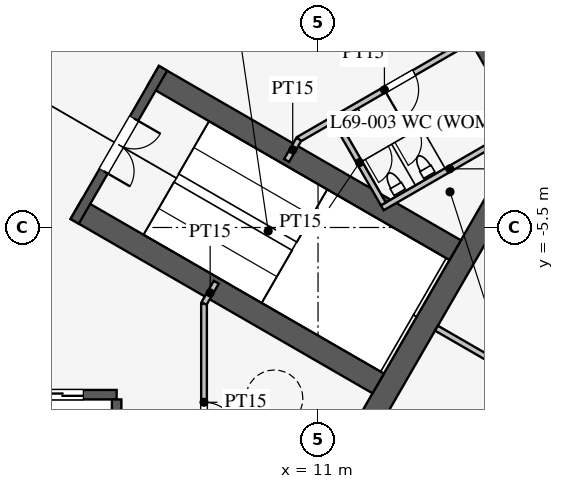
"""IFC4 building model, lengths in metres.
Left out: names, types, materials, properties, quantities, classifications, styles, units other than length and angle.
Written with IfcOpenShell. Run it as: python <this file> out.ifc"""

import sys

from ifc_helpers import new_model, si_unit, direction, frame, frame_2d, origin, place, context, subcontext, project, spatial, rectangle, extrude, element, fill, save


model = new_model("IFC4")
c1 = context("Model", 3, precision=1e-05, world=origin(), true_north=direction((0.0, 1.0)))
c2 = subcontext(c1, "Body", "Model", "MODEL_VIEW")
j1 = project(units=[si_unit("LENGTHUNIT", "METRE"), si_unit("PLANEANGLEUNIT", "RADIAN")], contexts=[c1])
p1 = place(None, origin())
s1 = spatial("IfcSite", under=j1, at=p1, CompositionType="ELEMENT")
p2 = place(p1, origin())
s2 = spatial("IfcBuilding", under=s1, at=p2, CompositionType="ELEMENT")
p3 = place(p2, frame((0.0, 0.0, 301.5)))
s3 = spatial("IfcBuildingStorey", under=s2, at=p3, CompositionType="ELEMENT", Elevation=301.5)
p4 = place(p3, frame((10.97, -13.0, 0.0), z_axis=(0.0, 0.0, 1.0), x_axis=(0.499995765644, 0.866027848477, 0.0)))
e1 = element("IfcWall", 1, at=p4, inside=s3, PredefinedType="SHEAR", context=c2, shape_type="SweptSolid", body=[
    extrude(rectangle(XDim=11.547, YDim=0.6, at=frame_2d((5.773, 0.0))), origin(), (0.0, 0.0, 1.0), 4.2),
])
p5 = place(p3, frame((16.743, -3.0, 0.0), z_axis=(0.0, 0.0, 1.0), x_axis=(-0.500002442456, 0.866023993627, 0.0)))
e2 = element("IfcWall", 2, at=p5, inside=s3, PredefinedType="SHEAR", context=c2, shape_type="SweptSolid", body=[
    extrude(rectangle(XDim=21.939, YDim=0.6, at=frame_2d((10.97, 0.0))), origin(), (0.0, 0.0, 1.0), 4.2),
])
p6 = place(p5, frame((17.27, 0.0, 0.0)))
e3 = element("IfcOpeningElement", 3, at=p6, cuts=e2, PredefinedType="OPENING", context=c2, shape_type="SweptSolid", body=[
    extrude(rectangle(XDim=1.2, YDim=2.1, at=frame_2d((0.6, 1.05))), frame((0.0, 0.31, 0.0), z_axis=(0.0, -1.0, 0.0), x_axis=(1.0, 0.0, 0.0)), (0.0, 0.0, 1.0), 0.62),
])
p7 = place(p5, frame((3.47, 0.0, 0.0)))
e4 = element("IfcOpeningElement", 4, at=p7, cuts=e2, PredefinedType="OPENING", context=c2, shape_type="SweptSolid", body=[
    extrude(rectangle(XDim=1.2, YDim=2.1, at=frame_2d((0.6, 1.05))), frame((0.0, 0.31, 0.0), z_axis=(0.0, -1.0, 0.0), x_axis=(1.0, 0.0, 0.0)), (0.0, 0.0, 1.0), 0.62),
])
p8 = place(p3, frame((-5.7, -9.9, 0.0), z_axis=(0.0, 0.0, 1.0), x_axis=(1.0, 0.0, 0.0)))
e5 = element("IfcWall", 5, at=p8, inside=s3, PredefinedType="SHEAR", context=c2, shape_type="SweptSolid", body=[
    extrude(rectangle(XDim=11.4, YDim=0.25, at=frame_2d((5.7, 0.0))), origin(), (0.0, 0.0, 1.0), 4.2),
])
p9 = place(p8, frame((0.875, 0.0, 0.0)))
e6 = element("IfcOpeningElement", 6, at=p9, cuts=e5, PredefinedType="OPENING", context=c2, shape_type="SweptSolid", body=[
    extrude(rectangle(XDim=1.1, YDim=2.2, at=frame_2d((0.55, 1.1))), frame((0.0, 0.135, 0.0), z_axis=(0.0, -1.0, 0.0), x_axis=(1.0, 0.0, 0.0)), (0.0, 0.0, 1.0), 0.27),
])
p10 = place(p8, frame((3.725, 0.0, 0.0)))
e7 = element("IfcOpeningElement", 7, at=p10, cuts=e5, PredefinedType="OPENING", context=c2, shape_type="SweptSolid", body=[
    extrude(rectangle(XDim=1.1, YDim=2.2, at=frame_2d((0.55, 1.1))), frame((0.0, 0.135, 0.0), z_axis=(0.0, -1.0, 0.0), x_axis=(1.0, 0.0, 0.0)), (0.0, 0.0, 1.0), 0.27),
])
p11 = place(p8, frame((6.575, 0.0, 0.0)))
e8 = element("IfcOpeningElement", 8, at=p11, cuts=e5, PredefinedType="OPENING", context=c2, shape_type="SweptSolid", body=[
    extrude(rectangle(XDim=1.1, YDim=2.2, at=frame_2d((0.55, 1.1))), frame((0.0, 0.135, 0.0), z_axis=(0.0, -1.0, 0.0), x_axis=(1.0, 0.0, 0.0)), (0.0, 0.0, 1.0), 0.27),
])
p12 = place(p8, frame((9.425, 0.0, 0.0)))
e9 = element("IfcOpeningElement", 9, at=p12, cuts=e5, PredefinedType="OPENING", context=c2, shape_type="SweptSolid", body=[
    extrude(rectangle(XDim=1.1, YDim=2.2, at=frame_2d((0.55, 1.1))), frame((0.0, 0.135, 0.0), z_axis=(0.0, -1.0, 0.0), x_axis=(1.0, 0.0, 0.0)), (0.0, 0.0, 1.0), 0.27),
])
p13 = place(p3, frame((5.7, -10.025, 0.0), z_axis=(0.0, 0.0, 1.0), x_axis=(0.0, -1.0, 0.0)))
e10 = element("IfcWall", 10, at=p13, inside=s3, PredefinedType="SHEAR", context=c2, shape_type="SweptSolid", body=[
    extrude(rectangle(XDim=2.675, YDim=0.25, at=frame_2d((1.337, 0.0))), origin(), (0.0, 0.0, 1.0), 4.2),
])
p14 = place(p3, frame((4.638, -5.016, 0.0), z_axis=(0.0, 0.0, 1.0), x_axis=(0.866012320003, -0.50002266109, 0.0)))
e11 = element("IfcWall", 11, at=p14, inside=s3, PredefinedType="SHEAR", context=c2, shape_type="SweptSolid", body=[
    extrude(rectangle(XDim=9.175, YDim=0.6, at=frame_2d((4.587, 0.0))), origin(), (0.0, 0.0, 1.0), 4.2),
])
p15 = place(p3, frame((6.663, -1.509, 0.0), z_axis=(0.0, 0.0, 1.0), x_axis=(0.86603049496, -0.499991181721, 0.0)))
e12 = element("IfcWall", 12, at=p15, inside=s3, PredefinedType="SHEAR", context=c2, shape_type="SweptSolid", body=[
    extrude(rectangle(XDim=9.175, YDim=0.6, at=frame_2d((4.587, 0.0))), origin(), (0.0, 0.0, 1.0), 4.2),
])
p16 = place(p3, frame((4.597, -5.339, 0.0), z_axis=(0.0, 0.0, 1.0), x_axis=(0.499984536904, 0.866034331223, 0.0)))
e13 = element("IfcWall", 13, at=p16, inside=s3, PredefinedType="SHEAR", context=c2, shape_type="SweptSolid", body=[
    extrude(rectangle(XDim=4.65, YDim=0.25, at=frame_2d((2.325, 0.0))), origin(), (0.0, 0.0, 1.0), 4.2),
])
p17 = place(p16, frame((1.525, 0.0, 0.0)))
e14 = element("IfcOpeningElement", 14, at=p17, cuts=e13, PredefinedType="OPENING", context=c2, shape_type="SweptSolid", body=[
    extrude(rectangle(XDim=1.6, YDim=2.1, at=frame_2d((0.8, 1.05))), frame((0.0, 0.135, 0.0), z_axis=(0.0, -1.0, 0.0), x_axis=(1.0, 0.0, 0.0)), (0.0, 0.0, 1.0), 0.27),
])
p18 = place(p3, frame((8.0, -7.5, 0.0), z_axis=(0.0, 0.0, 1.0), x_axis=(0.0, -1.0, 0.0)))
e15 = element("IfcWall", 15, at=p18, inside=s3, PredefinedType="PARTITIONING", context=c2, shape_type="SweptSolid", body=[
    extrude(rectangle(XDim=5.2, YDim=0.15, at=frame_2d((2.6, 0.0))), origin(), (0.0, 0.0, 1.0), 4.0),
])
p19 = place(p18, frame((2.6, 0.0, 0.0)))
e16 = element("IfcOpeningElement", 16, at=p19, cuts=e15, PredefinedType="OPENING", context=c2, shape_type="SweptSolid", body=[
    extrude(rectangle(XDim=0.9, YDim=2.1, at=frame_2d((0.45, 1.05))), frame((0.0, 0.085, 0.0), z_axis=(0.0, -1.0, 0.0), x_axis=(1.0, 0.0, 0.0)), (0.0, 0.0, 1.0), 0.17),
])
p20 = place(p3, frame((10.495, -3.178, 0.0), z_axis=(0.0, 0.0, 1.0), x_axis=(0.866021400173, 0.500006934395, 0.0)))
e17 = element("IfcWall", 17, at=p20, inside=s3, PredefinedType="PARTITIONING", context=c2, shape_type="SweptSolid", body=[
    extrude(rectangle(XDim=5.2, YDim=0.15, at=frame_2d((2.6, 0.0))), origin(), (0.0, 0.0, 1.0), 4.0),
])
p21 = place(p20, frame((2.6, 0.0, 0.0)))
e18 = element("IfcOpeningElement", 18, at=p21, cuts=e17, PredefinedType="OPENING", context=c2, shape_type="SweptSolid", body=[
    extrude(rectangle(XDim=0.9, YDim=2.1, at=frame_2d((0.45, 1.05))), frame((0.0, 0.085, 0.0), z_axis=(0.0, -1.0, 0.0), x_axis=(1.0, 0.0, 0.0)), (0.0, 0.0, 1.0), 0.17),
])
for number, where, z_axis, x_axis in (
    (19, (8.0, -7.5, 0.0), (0.0, 0.0, 1.0), (0.5, 0.866, 0.0)),
    (20, (10.495, -3.178, 0.0), (0.0, 0.0, 1.0), (-0.5, -0.866, 0.0)),
):
    element("IfcWall", number, at=place(p3, frame(where, z_axis=z_axis, x_axis=x_axis)), inside=s3, PredefinedType="PARTITIONING", context=c2, shape_type="SweptSolid", body=[
        extrude(rectangle(XDim=0.645, YDim=0.15, at=frame_2d((0.323, 0.0))), origin(), (0.0, 0.0, 1.0), 4.0),
    ])
p22 = place(p3, frame((12.691, -4.982, 0.0), z_axis=(0.0, 0.0, 1.0), x_axis=(0.8660249478, 0.500000789788, 0.0)))
e21 = element("IfcWall", 21, at=p22, inside=s3, PredefinedType="PARTITIONING", context=c2, shape_type="SweptSolid", body=[
    extrude(rectangle(XDim=4.1, YDim=0.15, at=frame_2d((2.05, 0.0))), origin(), (0.0, 0.0, 1.0), 4.0),
])
p23 = place(p3, frame((11.464, -2.706, 0.0), z_axis=(0.0, 0.0, 1.0), x_axis=(0.50001992892, -0.866013897511, 0.0)))
e22 = element("IfcWall", 22, at=p23, inside=s3, PredefinedType="PARTITIONING", context=c2, shape_type="SweptSolid", body=[
    extrude(rectangle(XDim=2.51, YDim=0.15, at=frame_2d((1.255, 0.0))), origin(), (0.0, 0.0, 1.0), 4.0),
])
p24 = place(p3, frame((14.116, -8.15, 0.0), z_axis=(0.0, 0.0, 1.0), x_axis=(0.866020541135, -0.500008422262, 0.0)))
e23 = element("IfcWall", 23, at=p24, inside=s3, PredefinedType="PARTITIONING", context=c2, shape_type="SweptSolid", body=[
    extrude(rectangle(XDim=13.45, YDim=0.15, at=frame_2d((6.725, 0.0))), origin(), (0.0, 0.0, 1.0), 2.5),
])
p25 = place(p3, frame((25.968, -14.657, 0.0), z_axis=(0.0, 0.0, 1.0), x_axis=(-0.500000361757, 0.866025194924, 0.0)))
e24 = element("IfcWall", 24, at=p25, inside=s3, PredefinedType="PARTITIONING", context=c2, shape_type="SweptSolid", body=[
    extrude(rectangle(XDim=51.355, YDim=0.12, at=frame_2d((25.678, 0.0))), origin(), (0.0, 0.0, 1.0), 2.9),
])
p26 = place(p25, frame((9.9, 0.0, 0.15)))
e25 = element("IfcOpeningElement", 25, at=p26, cuts=e24, PredefinedType="OPENING", context=c2, shape_type="SweptSolid", body=[
    extrude(rectangle(XDim=1.8, YDim=2.1, at=frame_2d((0.9, 1.05))), frame((0.0, 0.07, 0.0), z_axis=(0.0, -1.0, 0.0), x_axis=(1.0, 0.0, 0.0)), (0.0, 0.0, 1.0), 0.14),
])
p27 = place(p25, frame((39.65, 0.0, 0.15)))
e26 = element("IfcOpeningElement", 26, at=p27, cuts=e24, PredefinedType="OPENING", context=c2, shape_type="SweptSolid", body=[
    extrude(rectangle(XDim=1.8, YDim=2.1, at=frame_2d((0.9, 1.05))), frame((0.0, 0.07, 0.0), z_axis=(0.0, -1.0, 0.0), x_axis=(1.0, 0.0, 0.0)), (0.0, 0.0, 1.0), 0.14),
])
p28 = place(p19, origin())
e27 = element("IfcDoor", 27, at=p28, inside=s3, OperationType="SINGLE_SWING_RIGHT", PredefinedType="DOOR", context=c2, shape_type="SweptSolid", body=[
    extrude(rectangle(XDim=0.9, YDim=2.1, at=frame_2d((0.45, 1.05))), frame((0.0, 0.025, 0.0), z_axis=(0.0, -1.0, 0.0), x_axis=(1.0, 0.0, 0.0)), (0.0, 0.0, 1.0), 0.05),
])
fill(e16, e27)
p29 = place(p21, frame((0.9, 0.0, 0.0), z_axis=(0.0, 0.0, 1.0), x_axis=(-1.0, 0.0, 0.0)))
e28 = element("IfcDoor", 28, at=p29, inside=s3, OperationType="SINGLE_SWING_RIGHT", PredefinedType="DOOR", context=c2, shape_type="SweptSolid", body=[
    extrude(rectangle(XDim=0.9, YDim=2.1, at=frame_2d((0.45, 1.05))), frame((0.0, 0.025, 0.0), z_axis=(0.0, -1.0, 0.0), x_axis=(1.0, 0.0, 0.0)), (0.0, 0.0, 1.0), 0.05),
])
fill(e18, e28)
p30 = place(p17, frame((1.6, 0.0, 0.0), z_axis=(0.0, 0.0, 1.0), x_axis=(-1.0, 0.0, 0.0)))
e29 = element("IfcDoor", 29, at=p30, inside=s3, OperationType="DOUBLE_DOOR_SINGLE_SWING", PredefinedType="DOOR", context=c2, shape_type="SweptSolid", body=[
    extrude(rectangle(XDim=1.6, YDim=2.1, at=frame_2d((0.8, 1.05))), frame((0.0, 0.025, 0.0), z_axis=(0.0, -1.0, 0.0), x_axis=(1.0, 0.0, 0.0)), (0.0, 0.0, 1.0), 0.05),
])
fill(e14, e29)
p31 = place(p12, origin())
e30 = element("IfcDoor", 30, at=p31, inside=s3, OperationType="DOUBLE_DOOR_SLIDING", PredefinedType="DOOR", context=c2, shape_type="SweptSolid", body=[
    extrude(rectangle(XDim=1.1, YDim=2.2, at=frame_2d((0.55, 1.1))), frame((0.0, 0.025, 0.0), z_axis=(0.0, -1.0, 0.0), x_axis=(1.0, 0.0, 0.0)), (0.0, 0.0, 1.0), 0.05),
])
fill(e9, e30)
save(model, sys.argv[1])
